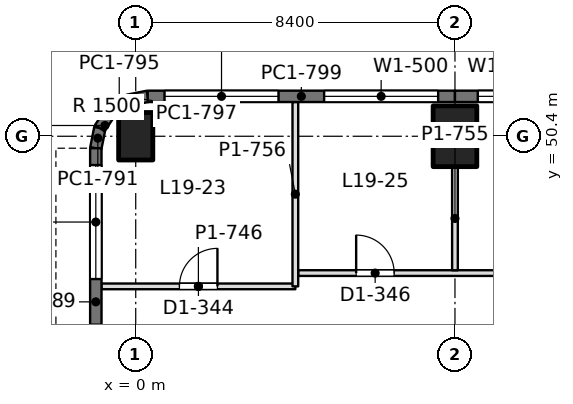
"""IFC4 building model, lengths in metres.
Left out: names, types, materials, properties, quantities, classifications, styles, units other than length and angle.
Written with IfcOpenShell. Run it as: python <this file> out.ifc"""

import sys

from ifc_helpers import new_model, si_unit, direction, frame, frame_2d, origin, origin_2d, place, context, subcontext, project, spatial, rectangle, extrude, element, fill, save


model = new_model("IFC4")
c1 = context("Model", 3, precision=1e-05, world=origin(), true_north=direction((0.0, 1.0)))
c2 = subcontext(c1, "Body", "Model", "MODEL_VIEW")
j1 = project(units=[si_unit("LENGTHUNIT", "METRE"), si_unit("PLANEANGLEUNIT", "RADIAN")], contexts=[c1])
p1 = place(None, origin())
s1 = spatial("IfcSite", under=j1, at=p1, CompositionType="ELEMENT")
p2 = place(p1, origin())
s2 = spatial("IfcBuilding", under=s1, at=p2, CompositionType="ELEMENT")
p3 = place(p2, frame((0.0, 0.0, 86.4)))
s3 = spatial("IfcBuildingStorey", under=s2, at=p3, CompositionType="ELEMENT", Elevation=86.4)
p4 = place(p3, frame((0.0, 50.4, 0.0), z_axis=(0.0, 0.0, 1.0), x_axis=(1.0, 0.0, 0.0)))
e1 = element("IfcColumn", 1, at=p4, inside=s3, PredefinedType="COLUMN", context=c2, shape_type="SweptSolid", body=[
    extrude(rectangle(XDim=0.9, YDim=1.25, at=origin_2d()), origin(), (0.0, 0.0, 1.0), 4.5),
])
p5 = place(p3, frame((8.4, 50.4, 0.0), z_axis=(0.0, 0.0, 1.0), x_axis=(1.0, 0.0, 0.0)))
e2 = element("IfcColumn", 2, at=p5, inside=s3, PredefinedType="COLUMN", context=c2, shape_type="SweptSolid", body=[
    extrude(rectangle(XDim=1.15, YDim=1.6, at=origin_2d()), origin(), (0.0, 0.0, 1.0), 4.5),
])
p6 = place(p3, frame((-1.05, 42.0, 0.0), z_axis=(0.0, 0.0, 1.0), x_axis=(0.0, 1.0, 0.0)))
e3 = element("IfcWall", 3, at=p6, inside=s3, PredefinedType="SOLIDWALL", context=c2, shape_type="SweptSolid", body=[
    extrude(rectangle(XDim=8.085, YDim=0.3, at=frame_2d((4.042, 0.0))), origin(), (0.0, 0.0, 1.0), 4.3),
])
p7 = place(p6, frame((0.443, 0.0, 0.9)))
e4 = element("IfcOpeningElement", 4, at=p7, cuts=e3, PredefinedType="OPENING", context=c2, shape_type="SweptSolid", body=[
    extrude(rectangle(XDim=3.0, YDim=1.9, at=frame_2d((1.5, 0.95))), frame((0.0, 0.16, 0.0), z_axis=(0.0, -1.0, 0.0), x_axis=(1.0, 0.0, 0.0)), (0.0, 0.0, 1.0), 0.32),
])
p8 = place(p6, frame((4.643, 0.0, 0.9)))
e5 = element("IfcOpeningElement", 5, at=p8, cuts=e3, PredefinedType="OPENING", context=c2, shape_type="SweptSolid", body=[
    extrude(rectangle(XDim=3.0, YDim=1.9, at=frame_2d((1.5, 0.95))), frame((0.0, 0.16, 0.0), z_axis=(0.0, -1.0, 0.0), x_axis=(1.0, 0.0, 0.0)), (0.0, 0.0, 1.0), 0.32),
])
p9 = place(p3, frame((-1.05, 50.085, 0.0), z_axis=(0.0, 0.0, 1.0), x_axis=(0.195073962632, 0.980788534345, 0.0)))
e6 = element("IfcWall", 6, at=p9, inside=s3, PredefinedType="SOLIDWALL", context=c2, shape_type="SweptSolid", body=[
    extrude(rectangle(XDim=0.541, YDim=0.3, at=frame_2d((0.271, 0.0))), origin(), (0.0, 0.0, 1.0), 4.3),
])
for number, where, z_axis, x_axis in (
    (7, (-0.945, 50.615, 0.0), (0.0, 0.0, 1.0), (0.556, 0.831, 0.0)),
    (8, (-0.653, 51.052, 0.0), (0.0, 0.0, 1.0), (0.831, 0.556, 0.0)),
):
    element("IfcWall", number, at=place(p3, frame(where, z_axis=z_axis, x_axis=x_axis)), inside=s3, PredefinedType="SOLIDWALL", context=c2, shape_type="SweptSolid", body=[
        extrude(rectangle(XDim=0.526, YDim=0.3, at=frame_2d((0.263, 0.0))), origin(), (0.0, 0.0, 1.0), 4.3),
    ])
p10 = place(p3, frame((-0.216, 51.344, 0.0), z_axis=(0.0, 0.0, 1.0), x_axis=(0.980788534345, 0.195073962632, 0.0)))
e9 = element("IfcWall", 9, at=p10, inside=s3, PredefinedType="SOLIDWALL", context=c2, shape_type="SweptSolid", body=[
    extrude(rectangle(XDim=0.541, YDim=0.3, at=frame_2d((0.271, 0.0))), origin(), (0.0, 0.0, 1.0), 4.3),
])
p11 = place(p3, frame((0.315, 51.45, 0.0), z_axis=(0.0, 0.0, 1.0), x_axis=(1.0, 0.0, 0.0)))
e10 = element("IfcWall", 10, at=p11, inside=s3, PredefinedType="SOLIDWALL", context=c2, shape_type="SweptSolid", body=[
    extrude(rectangle(XDim=8.085, YDim=0.3, at=frame_2d((4.042, 0.0))), origin(), (0.0, 0.0, 1.0), 4.3),
])
p12 = place(p11, frame((0.443, 0.0, 0.9)))
e11 = element("IfcOpeningElement", 11, at=p12, cuts=e10, PredefinedType="OPENING", context=c2, shape_type="SweptSolid", body=[
    extrude(rectangle(XDim=3.0, YDim=1.9, at=frame_2d((1.5, 0.95))), frame((0.0, 0.16, 0.0), z_axis=(0.0, -1.0, 0.0), x_axis=(1.0, 0.0, 0.0)), (0.0, 0.0, 1.0), 0.32),
])
p13 = place(p11, frame((4.643, 0.0, 0.9)))
e12 = element("IfcOpeningElement", 12, at=p13, cuts=e10, PredefinedType="OPENING", context=c2, shape_type="SweptSolid", body=[
    extrude(rectangle(XDim=3.0, YDim=1.9, at=frame_2d((1.5, 0.95))), frame((0.0, 0.16, 0.0), z_axis=(0.0, -1.0, 0.0), x_axis=(1.0, 0.0, 0.0)), (0.0, 0.0, 1.0), 0.32),
])
p14 = place(p3, frame((8.4, 51.45, 0.0), z_axis=(0.0, 0.0, 1.0), x_axis=(1.0, 0.0, 0.0)))
e13 = element("IfcWall", 13, at=p14, inside=s3, PredefinedType="SOLIDWALL", context=c2, shape_type="SweptSolid", body=[
    extrude(rectangle(XDim=8.4, YDim=0.3, at=frame_2d((4.2, 0.0))), origin(), (0.0, 0.0, 1.0), 4.3),
])
p15 = place(p14, frame((0.6, 0.0, 0.9)))
e14 = element("IfcOpeningElement", 14, at=p15, cuts=e13, PredefinedType="OPENING", context=c2, shape_type="SweptSolid", body=[
    extrude(rectangle(XDim=3.0, YDim=1.9, at=frame_2d((1.5, 0.95))), frame((0.0, 0.16, 0.0), z_axis=(0.0, -1.0, 0.0), x_axis=(1.0, 0.0, 0.0)), (0.0, 0.0, 1.0), 0.32),
])
p16 = place(p14, frame((4.8, 0.0, 0.9)))
e15 = element("IfcOpeningElement", 15, at=p16, cuts=e13, PredefinedType="OPENING", context=c2, shape_type="SweptSolid", body=[
    extrude(rectangle(XDim=3.0, YDim=1.9, at=frame_2d((1.5, 0.95))), frame((0.0, 0.16, 0.0), z_axis=(0.0, -1.0, 0.0), x_axis=(1.0, 0.0, 0.0)), (0.0, 0.0, 1.0), 0.32),
])
p17 = place(p3, frame((-0.902, 46.45, 0.0), z_axis=(0.0, 0.0, 1.0), x_axis=(1.0, 0.0, 0.0)))
e16 = element("IfcWall", 16, at=p17, inside=s3, PredefinedType="PARTITIONING", context=c2, shape_type="SweptSolid", body=[
    extrude(rectangle(XDim=5.102, YDim=0.15, at=frame_2d((2.551, 0.0))), origin(), (0.0, 0.0, 1.0), 3.7),
])
p18 = place(p17, frame((2.052, 0.0, 0.0)))
e17 = element("IfcOpeningElement", 17, at=p18, cuts=e16, PredefinedType="OPENING", context=c2, shape_type="SweptSolid", body=[
    extrude(rectangle(XDim=1.0, YDim=2.2, at=frame_2d((0.5, 1.1))), frame((0.0, 0.085, 0.0), z_axis=(0.0, -1.0, 0.0), x_axis=(1.0, 0.0, 0.0)), (0.0, 0.0, 1.0), 0.17),
])
p19 = place(p3, frame((4.274, 46.8, 0.0), z_axis=(0.0, 0.0, 1.0), x_axis=(1.0, 0.0, 0.0)))
e18 = element("IfcWall", 18, at=p19, inside=s3, PredefinedType="PARTITIONING", context=c2, shape_type="SweptSolid", body=[
    extrude(rectangle(XDim=12.452, YDim=0.15, at=frame_2d((6.226, 0.0))), origin(), (0.0, 0.0, 1.0), 3.6),
])
p20 = place(p19, frame((1.526, 0.0, 0.0)))
e19 = element("IfcOpeningElement", 19, at=p20, cuts=e18, PredefinedType="OPENING", context=c2, shape_type="SweptSolid", body=[
    extrude(rectangle(XDim=1.0, YDim=2.2, at=frame_2d((0.5, 1.1))), frame((0.0, 0.085, 0.0), z_axis=(0.0, -1.0, 0.0), x_axis=(1.0, 0.0, 0.0)), (0.0, 0.0, 1.0), 0.17),
])
p21 = place(p19, frame((5.726, 0.0, 0.0)))
e20 = element("IfcOpeningElement", 20, at=p21, cuts=e18, PredefinedType="OPENING", context=c2, shape_type="SweptSolid", body=[
    extrude(rectangle(XDim=1.0, YDim=2.2, at=frame_2d((0.5, 1.1))), frame((0.0, 0.085, 0.0), z_axis=(0.0, -1.0, 0.0), x_axis=(1.0, 0.0, 0.0)), (0.0, 0.0, 1.0), 0.17),
])
p22 = place(p19, frame((9.926, 0.0, 0.0)))
e21 = element("IfcOpeningElement", 21, at=p22, cuts=e18, PredefinedType="OPENING", context=c2, shape_type="SweptSolid", body=[
    extrude(rectangle(XDim=1.0, YDim=2.2, at=frame_2d((0.5, 1.1))), frame((0.0, 0.085, 0.0), z_axis=(0.0, -1.0, 0.0), x_axis=(1.0, 0.0, 0.0)), (0.0, 0.0, 1.0), 0.17),
])
p23 = place(p3, frame((4.2, 46.45, 0.0), z_axis=(0.0, 0.0, 1.0), x_axis=(0.0, 1.0, 0.0)))
e22 = element("IfcWall", 22, at=p23, inside=s3, PredefinedType="PARTITIONING", context=c2, shape_type="SweptSolid", body=[
    extrude(rectangle(XDim=4.852, YDim=0.15, at=frame_2d((2.426, 0.0))), origin(), (0.0, 0.0, 1.0), 3.854),
])
p24 = place(p3, frame((8.4, 46.874, 0.0), z_axis=(0.0, 0.0, 1.0), x_axis=(0.0, 1.0, 0.0)))
e23 = element("IfcWall", 23, at=p24, inside=s3, PredefinedType="PARTITIONING", context=c2, shape_type="SweptSolid", body=[
    extrude(rectangle(XDim=2.727, YDim=0.15, at=frame_2d((1.364, 0.0))), origin(), (0.0, 0.0, 1.0), 3.6),
])
p25 = place(p8, origin())
e24 = element("IfcWindow", 24, at=p25, inside=s3, PartitioningType="SINGLE_PANEL", PredefinedType="WINDOW", context=c2, shape_type="SweptSolid", body=[
    extrude(rectangle(XDim=3.0, YDim=1.9, at=frame_2d((1.5, 0.95))), frame((0.0, 0.03, 0.0), z_axis=(0.0, -1.0, 0.0), x_axis=(1.0, 0.0, 0.0)), (0.0, 0.0, 1.0), 0.06),
])
fill(e5, e24)
p26 = place(p12, origin())
e25 = element("IfcWindow", 25, at=p26, inside=s3, PartitioningType="SINGLE_PANEL", PredefinedType="WINDOW", context=c2, shape_type="SweptSolid", body=[
    extrude(rectangle(XDim=3.0, YDim=1.9, at=frame_2d((1.5, 0.95))), frame((0.0, 0.03, 0.0), z_axis=(0.0, -1.0, 0.0), x_axis=(1.0, 0.0, 0.0)), (0.0, 0.0, 1.0), 0.06),
])
fill(e11, e25)
p27 = place(p13, origin())
e26 = element("IfcWindow", 26, at=p27, inside=s3, PartitioningType="SINGLE_PANEL", PredefinedType="WINDOW", context=c2, shape_type="SweptSolid", body=[
    extrude(rectangle(XDim=3.0, YDim=1.9, at=frame_2d((1.5, 0.95))), frame((0.0, 0.03, 0.0), z_axis=(0.0, -1.0, 0.0), x_axis=(1.0, 0.0, 0.0)), (0.0, 0.0, 1.0), 0.06),
])
fill(e12, e26)
p28 = place(p15, origin())
e27 = element("IfcWindow", 27, at=p28, inside=s3, PartitioningType="SINGLE_PANEL", PredefinedType="WINDOW", context=c2, shape_type="SweptSolid", body=[
    extrude(rectangle(XDim=3.0, YDim=1.9, at=frame_2d((1.5, 0.95))), frame((0.0, 0.03, 0.0), z_axis=(0.0, -1.0, 0.0), x_axis=(1.0, 0.0, 0.0)), (0.0, 0.0, 1.0), 0.06),
])
fill(e14, e27)
p29 = place(p18, origin())
e28 = element("IfcDoor", 28, at=p29, inside=s3, OperationType="SINGLE_SWING_RIGHT", PredefinedType="DOOR", context=c2, shape_type="SweptSolid", body=[
    extrude(rectangle(XDim=1.0, YDim=2.2, at=frame_2d((0.5, 1.1))), frame((0.0, 0.025, 0.0), z_axis=(0.0, -1.0, 0.0), x_axis=(1.0, 0.0, 0.0)), (0.0, 0.0, 1.0), 0.05),
])
fill(e17, e28)
p30 = place(p20, origin())
e29 = element("IfcDoor", 29, at=p30, inside=s3, OperationType="SINGLE_SWING_LEFT", PredefinedType="DOOR", context=c2, shape_type="SweptSolid", body=[
    extrude(rectangle(XDim=1.0, YDim=2.2, at=frame_2d((0.5, 1.1))), frame((0.0, 0.025, 0.0), z_axis=(0.0, -1.0, 0.0), x_axis=(1.0, 0.0, 0.0)), (0.0, 0.0, 1.0), 0.05),
])
fill(e19, e29)
save(model, sys.argv[1])
